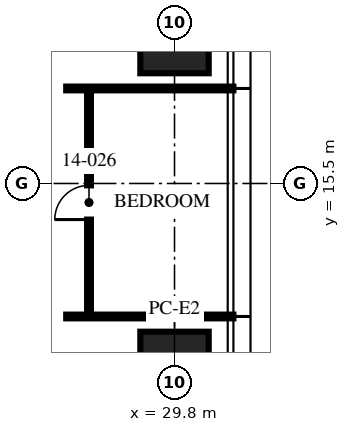
"""IFC4 building model, lengths in metres.
Left out: names, types, materials, properties, quantities, classifications, styles, units other than length and angle.
Written with IfcOpenShell. Run it as: python <this file> out.ifc"""

import sys

from ifc_helpers import new_model, si_unit, direction, frame, frame_2d, origin, origin_2d, place, context, subcontext, project, spatial, rectangle, hollow_rectangle, extrude, element, fill, save


model = new_model("IFC4")
c1 = context("Model", 3, precision=1e-05, world=origin(), true_north=direction((0.0, 1.0)))
c2 = subcontext(c1, "Body", "Model", "MODEL_VIEW")
j1 = project(units=[si_unit("LENGTHUNIT", "METRE"), si_unit("PLANEANGLEUNIT", "RADIAN")], contexts=[c1])
p1 = place(None, origin())
s1 = spatial("IfcSite", under=j1, at=p1, CompositionType="ELEMENT")
p2 = place(p1, origin())
s2 = spatial("IfcBuilding", under=s1, at=p2, CompositionType="ELEMENT")
p3 = place(p2, frame((0.0, 0.0, 58.5)))
s3 = spatial("IfcBuildingStorey", under=s2, at=p3, CompositionType="ELEMENT", Elevation=58.5)
for number, where, z_axis, x_axis in (
    (1, (29.8, 20.0, 0.0), (0.0, 0.0, 1.0), (0.0, 1.0, 0.0)),
    (2, (29.8, 10.0, 0.0), (0.0, 0.0, 1.0), (0.0, 1.0, 0.0)),
):
    element("IfcColumn", number, at=place(p3, frame(where, z_axis=z_axis, x_axis=x_axis)), inside=s3, PredefinedType="COLUMN", context=c2, shape_type="SweptSolid", body=[
        extrude(hollow_rectangle(XDim=3.2, YDim=1.8, WallThickness=0.2, at=origin_2d()), origin(), (0.0, 0.0, 1.0), 3.75),
    ])
for number, where, z_axis, x_axis in (
    (3, (26.95, 12.0, 0.0), (0.0, 0.0, 1.0), (1.0, 0.0, 0.0)),
    (4, (26.95, 18.0, 0.0), (0.0, 0.0, 1.0), (1.0, 0.0, 0.0)),
):
    element("IfcWall", number, at=place(p3, frame(where, z_axis=z_axis, x_axis=x_axis)), inside=s3, PredefinedType="PARTITIONING", context=c2, shape_type="SweptSolid", body=[
        extrude(rectangle(XDim=4.4, YDim=0.1, at=frame_2d((2.2, 0.0))), origin(), (0.0, 0.0, 1.0), 2.71),
    ])
p4 = place(p3, frame((27.55, 12.0, 0.0), z_axis=(0.0, 0.0, 1.0), x_axis=(0.0, 1.0, 0.0)))
e5 = element("IfcWall", 5, at=p4, inside=s3, PredefinedType="PARTITIONING", context=c2, shape_type="SweptSolid", body=[
    extrude(rectangle(XDim=6.0, YDim=0.1, at=frame_2d((3.0, 0.0))), origin(), (0.0, 0.0, 1.0), 2.61),
])
p5 = place(p4, frame((2.55, 0.0, 0.0)))
e6 = element("IfcOpeningElement", 6, at=p5, cuts=e5, PredefinedType="OPENING", context=c2, shape_type="SweptSolid", body=[
    extrude(rectangle(XDim=0.9, YDim=2.1, at=frame_2d((0.45, 1.05))), frame((0.0, 0.06, 0.0), z_axis=(0.0, -1.0, 0.0), x_axis=(1.0, 0.0, 0.0)), (0.0, 0.0, 1.0), 0.12),
])
p6 = place(p5, origin())
e7 = element("IfcDoor", 7, at=p6, inside=s3, OperationType="SINGLE_SWING_LEFT", PredefinedType="DOOR", context=c2, shape_type="SweptSolid", body=[
    extrude(rectangle(XDim=0.9, YDim=2.1, at=frame_2d((0.45, 1.05))), frame((0.0, 0.025, 0.0), z_axis=(0.0, -1.0, 0.0), x_axis=(1.0, 0.0, 0.0)), (0.0, 0.0, 1.0), 0.05),
])
fill(e6, e7)
save(model, sys.argv[1])
